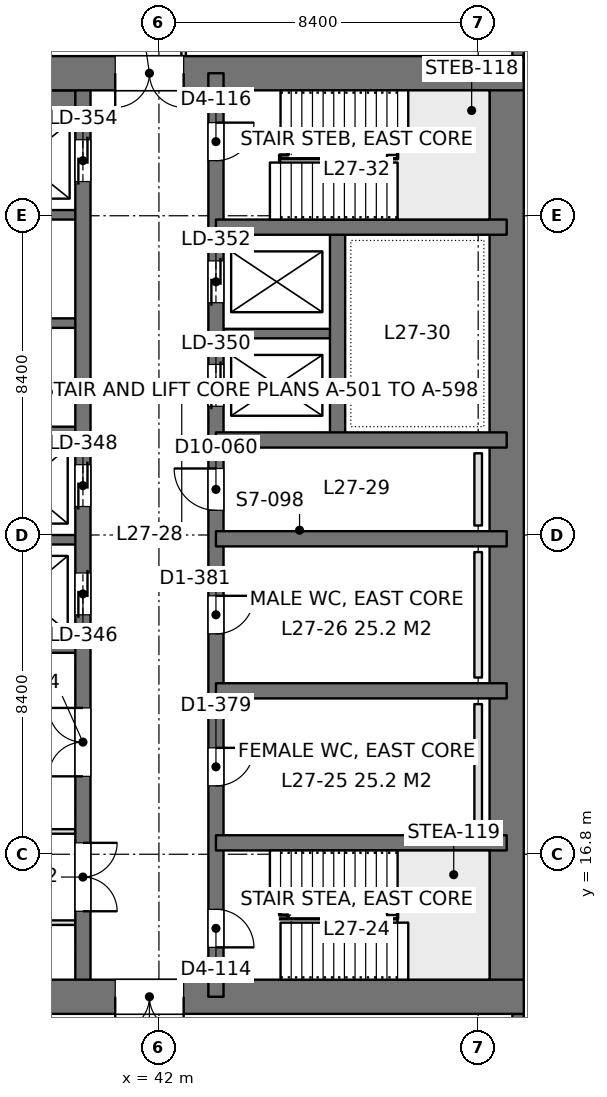
"""IFC4 building model, lengths in metres.
Left out: names, types, materials, properties, quantities, classifications, styles, units other than length and angle.
Written with IfcOpenShell. Run it as: python <this file> out.ifc"""

import sys

from ifc_helpers import new_model, si_unit, direction, frame, frame_2d, origin, place, context, subcontext, project, spatial, rectangle, extrude, element, fill, save


model = new_model("IFC4")
c1 = context("Model", 3, precision=1e-05, world=origin(), true_north=direction((0.0, 1.0)))
c2 = subcontext(c1, "Body", "Model", "MODEL_VIEW")
j1 = project(units=[si_unit("LENGTHUNIT", "METRE"), si_unit("PLANEANGLEUNIT", "RADIAN")], contexts=[c1])
p1 = place(None, origin())
s1 = spatial("IfcSite", under=j1, at=p1, CompositionType="ELEMENT")
p2 = place(p1, origin())
s2 = spatial("IfcBuilding", under=s1, at=p2, CompositionType="ELEMENT")
p3 = place(p2, frame((0.0, 0.0, 121.8)))
s3 = spatial("IfcBuildingStorey", under=s2, at=p3, CompositionType="ELEMENT", Elevation=121.8)
p4 = place(p3, frame((33.6, 13.05, 0.0), z_axis=(0.0, 0.0, 1.0), x_axis=(1.0, 0.0, 0.0)))
e1 = element("IfcWall", 1, at=p4, inside=s3, PredefinedType="SHEAR", context=c2, shape_type="SweptSolid", body=[
    extrude(rectangle(XDim=18.0, YDim=0.9, at=frame_2d((9.0, 0.0))), origin(), (0.0, 0.0, 1.0), 4.2),
])
p5 = place(p4, frame((7.25, 0.0, 0.0)))
e2 = element("IfcOpeningElement", 2, at=p5, cuts=e1, PredefinedType="OPENING", context=c2, shape_type="SweptSolid", body=[
    extrude(rectangle(XDim=1.8, YDim=2.4, at=frame_2d((0.9, 1.2))), frame((0.0, 0.46, 0.0), z_axis=(0.0, -1.0, 0.0), x_axis=(1.0, 0.0, 0.0)), (0.0, 0.0, 1.0), 0.92),
])
p6 = place(p3, frame((33.6, 37.35, 0.0), z_axis=(0.0, 0.0, 1.0), x_axis=(1.0, 0.0, 0.0)))
e3 = element("IfcWall", 3, at=p6, inside=s3, PredefinedType="SHEAR", context=c2, shape_type="SweptSolid", body=[
    extrude(rectangle(XDim=18.0, YDim=0.9, at=frame_2d((9.0, 0.0))), origin(), (0.0, 0.0, 1.0), 4.2),
])
p7 = place(p6, frame((7.25, 0.0, 0.0)))
e4 = element("IfcOpeningElement", 4, at=p7, cuts=e3, PredefinedType="OPENING", context=c2, shape_type="SweptSolid", body=[
    extrude(rectangle(XDim=1.8, YDim=2.4, at=frame_2d((0.9, 1.2))), frame((0.0, 0.46, 0.0), z_axis=(0.0, -1.0, 0.0), x_axis=(1.0, 0.0, 0.0)), (0.0, 0.0, 1.0), 0.92),
])
p8 = place(p3, frame((51.15, 13.05, 0.0), z_axis=(0.0, 0.0, 1.0), x_axis=(0.0, 1.0, 0.0)))
e5 = element("IfcWall", 5, at=p8, inside=s3, PredefinedType="SHEAR", context=c2, shape_type="SweptSolid", body=[
    extrude(rectangle(XDim=24.3, YDim=0.9, at=frame_2d((12.15, 0.0))), origin(), (0.0, 0.0, 1.0), 4.2),
])
p9 = place(p3, frame((43.5, 13.05, 0.0), z_axis=(0.0, 0.0, 1.0), x_axis=(0.0, 1.0, 0.0)))
e6 = element("IfcWall", 6, at=p9, inside=s3, PredefinedType="SHEAR", context=c2, shape_type="SweptSolid", body=[
    extrude(rectangle(XDim=24.3, YDim=0.4, at=frame_2d((12.15, 0.0))), origin(), (0.0, 0.0, 1.0), 4.2),
])
p10 = place(p9, frame((1.3, 0.0, 0.0)))
e7 = element("IfcOpeningElement", 7, at=p10, cuts=e6, PredefinedType="OPENING", context=c2, shape_type="SweptSolid", body=[
    extrude(rectangle(XDim=1.0, YDim=2.2, at=frame_2d((0.5, 1.1))), frame((0.0, 0.21, 0.0), z_axis=(0.0, -1.0, 0.0), x_axis=(1.0, 0.0, 0.0)), (0.0, 0.0, 1.0), 0.42),
])
p11 = place(p9, frame((22.0, 0.0, 0.0)))
e8 = element("IfcOpeningElement", 8, at=p11, cuts=e6, PredefinedType="OPENING", context=c2, shape_type="SweptSolid", body=[
    extrude(rectangle(XDim=1.0, YDim=2.2, at=frame_2d((0.5, 1.1))), frame((0.0, 0.21, 0.0), z_axis=(0.0, -1.0, 0.0), x_axis=(1.0, 0.0, 0.0)), (0.0, 0.0, 1.0), 0.42),
])
p12 = place(p9, frame((5.55, 0.0, 0.0)))
e9 = element("IfcOpeningElement", 9, at=p12, cuts=e6, PredefinedType="OPENING", context=c2, shape_type="SweptSolid", body=[
    extrude(rectangle(XDim=1.0, YDim=2.2, at=frame_2d((0.5, 1.1))), frame((0.0, 0.21, 0.0), z_axis=(0.0, -1.0, 0.0), x_axis=(1.0, 0.0, 0.0)), (0.0, 0.0, 1.0), 0.42),
])
p13 = place(p9, frame((9.55, 0.0, 0.0)))
e10 = element("IfcOpeningElement", 10, at=p13, cuts=e6, PredefinedType="OPENING", context=c2, shape_type="SweptSolid", body=[
    extrude(rectangle(XDim=1.0, YDim=2.2, at=frame_2d((0.5, 1.1))), frame((0.0, 0.21, 0.0), z_axis=(0.0, -1.0, 0.0), x_axis=(1.0, 0.0, 0.0)), (0.0, 0.0, 1.0), 0.42),
])
p14 = place(p9, frame((12.8, 0.0, 0.0)))
e11 = element("IfcOpeningElement", 11, at=p14, cuts=e6, PredefinedType="OPENING", context=c2, shape_type="SweptSolid", body=[
    extrude(rectangle(XDim=1.1, YDim=2.2, at=frame_2d((0.55, 1.1))), frame((0.0, 0.21, 0.0), z_axis=(0.0, -1.0, 0.0), x_axis=(1.0, 0.0, 0.0)), (0.0, 0.0, 1.0), 0.42),
])
p15 = place(p9, frame((15.538, 0.0, 0.0)))
e12 = element("IfcOpeningElement", 12, at=p15, cuts=e6, PredefinedType="OPENING", context=c2, shape_type="SweptSolid", body=[
    extrude(rectangle(XDim=1.1, YDim=2.2, at=frame_2d((0.55, 1.1))), frame((0.0, 0.21, 0.0), z_axis=(0.0, -1.0, 0.0), x_axis=(1.0, 0.0, 0.0)), (0.0, 0.0, 1.0), 0.42),
])
p16 = place(p9, frame((18.262, 0.0, 0.0)))
e13 = element("IfcOpeningElement", 13, at=p16, cuts=e6, PredefinedType="OPENING", context=c2, shape_type="SweptSolid", body=[
    extrude(rectangle(XDim=1.1, YDim=2.2, at=frame_2d((0.55, 1.1))), frame((0.0, 0.21, 0.0), z_axis=(0.0, -1.0, 0.0), x_axis=(1.0, 0.0, 0.0)), (0.0, 0.0, 1.0), 0.42),
])
p17 = place(p3, frame((40.0, 13.05, 0.0), z_axis=(0.0, 0.0, 1.0), x_axis=(0.0, 1.0, 0.0)))
e14 = element("IfcWall", 14, at=p17, inside=s3, PredefinedType="SHEAR", context=c2, shape_type="SweptSolid", body=[
    extrude(rectangle(XDim=24.3, YDim=0.4, at=frame_2d((12.15, 0.0))), origin(), (0.0, 0.0, 1.0), 4.2),
])
p18 = place(p17, frame((10.05, 0.0, 0.0)))
e15 = element("IfcOpeningElement", 15, at=p18, cuts=e14, PredefinedType="OPENING", context=c2, shape_type="SweptSolid", body=[
    extrude(rectangle(XDim=1.1, YDim=2.2, at=frame_2d((0.55, 1.1))), frame((0.0, 0.21, 0.0), z_axis=(0.0, -1.0, 0.0), x_axis=(1.0, 0.0, 0.0)), (0.0, 0.0, 1.0), 0.42),
])
p19 = place(p17, frame((12.9, 0.0, 0.0)))
e16 = element("IfcOpeningElement", 16, at=p19, cuts=e14, PredefinedType="OPENING", context=c2, shape_type="SweptSolid", body=[
    extrude(rectangle(XDim=1.1, YDim=2.2, at=frame_2d((0.55, 1.1))), frame((0.0, 0.21, 0.0), z_axis=(0.0, -1.0, 0.0), x_axis=(1.0, 0.0, 0.0)), (0.0, 0.0, 1.0), 0.42),
])
p20 = place(p17, frame((21.45, 0.0, 0.0)))
e17 = element("IfcOpeningElement", 17, at=p20, cuts=e14, PredefinedType="OPENING", context=c2, shape_type="SweptSolid", body=[
    extrude(rectangle(XDim=1.1, YDim=2.2, at=frame_2d((0.55, 1.1))), frame((0.0, 0.21, 0.0), z_axis=(0.0, -1.0, 0.0), x_axis=(1.0, 0.0, 0.0)), (0.0, 0.0, 1.0), 0.42),
])
p21 = place(p17, frame((2.25, 0.0, 0.0)))
e18 = element("IfcOpeningElement", 18, at=p21, cuts=e14, PredefinedType="OPENING", context=c2, shape_type="SweptSolid", body=[
    extrude(rectangle(XDim=1.8, YDim=2.4, at=frame_2d((0.9, 1.2))), frame((0.0, 0.21, 0.0), z_axis=(0.0, -1.0, 0.0), x_axis=(1.0, 0.0, 0.0)), (0.0, 0.0, 1.0), 0.42),
])
p22 = place(p17, frame((5.8, 0.0, 0.0)))
e19 = element("IfcOpeningElement", 19, at=p22, cuts=e14, PredefinedType="OPENING", context=c2, shape_type="SweptSolid", body=[
    extrude(rectangle(XDim=1.8, YDim=2.4, at=frame_2d((0.9, 1.2))), frame((0.0, 0.21, 0.0), z_axis=(0.0, -1.0, 0.0), x_axis=(1.0, 0.0, 0.0)), (0.0, 0.0, 1.0), 0.42),
])
for number, where, z_axis, x_axis in (
    (20, (51.15, 17.1, 0.0), (0.0, 0.0, 1.0), (-1.0, 0.0, 0.0)),
    (21, (51.15, 21.1, 0.0), (0.0, 0.0, 1.0), (-1.0, 0.0, 0.0)),
    (22, (51.15, 25.1, 0.0), (0.0, 0.0, 1.0), (-1.0, 0.0, 0.0)),
    (23, (51.15, 27.7, 0.0), (0.0, 0.0, 1.0), (-1.0, 0.0, 0.0)),
    (24, (51.15, 33.3, 0.0), (0.0, 0.0, 1.0), (-1.0, 0.0, 0.0)),
):
    element("IfcWall", number, at=place(p3, frame(where, z_axis=z_axis, x_axis=x_axis)), inside=s3, PredefinedType="SHEAR", context=c2, shape_type="SweptSolid", body=[
        extrude(rectangle(XDim=7.65, YDim=0.4, at=frame_2d((3.825, 0.0))), origin(), (0.0, 0.0, 1.0), 4.2),
    ])
p23 = place(p3, frame((46.7, 27.7, 0.0), z_axis=(0.0, 0.0, 1.0), x_axis=(0.0, 1.0, 0.0)))
e25 = element("IfcWall", 25, at=p23, inside=s3, PredefinedType="SHEAR", context=c2, shape_type="SweptSolid", body=[
    extrude(rectangle(XDim=5.6, YDim=0.4, at=frame_2d((2.8, 0.0))), origin(), (0.0, 0.0, 1.0), 4.2),
])
p24 = place(p3, frame((46.7, 30.5, 0.0), z_axis=(0.0, 0.0, 1.0), x_axis=(-1.0, 0.0, 0.0)))
e26 = element("IfcWall", 26, at=p24, inside=s3, PredefinedType="SHEAR", context=c2, shape_type="SweptSolid", body=[
    extrude(rectangle(XDim=3.2, YDim=0.25, at=frame_2d((1.6, 0.0))), origin(), (0.0, 0.0, 1.0), 4.2),
])
p25 = place(p3, frame((40.0, 22.225, 0.0), z_axis=(0.0, 0.0, 1.0), x_axis=(-1.0, 0.0, 0.0)))
e27 = element("IfcWall", 27, at=p25, inside=s3, PredefinedType="SHEAR", context=c2, shape_type="SweptSolid", body=[
    extrude(rectangle(XDim=5.95, YDim=0.25, at=frame_2d((2.975, 0.0))), origin(), (0.0, 0.0, 1.0), 4.2),
])
for number, where, z_axis, x_axis in (
    (28, (40.0, 25.075, 0.0), (0.0, 0.0, 1.0), (-1.0, 0.0, 0.0)),
    (29, (40.0, 27.925, 0.0), (0.0, 0.0, 1.0), (-1.0, 0.0, 0.0)),
    (30, (40.0, 30.775, 0.0), (0.0, 0.0, 1.0), (-1.0, 0.0, 0.0)),
    (31, (40.0, 33.625, 0.0), (0.0, 0.0, 1.0), (-1.0, 0.0, 0.0)),
):
    element("IfcWall", number, at=place(p3, frame(where, z_axis=z_axis, x_axis=x_axis)), inside=s3, PredefinedType="SHEAR", context=c2, shape_type="SweptSolid", body=[
        extrude(rectangle(XDim=3.2, YDim=0.25, at=frame_2d((1.6, 0.0))), origin(), (0.0, 0.0, 1.0), 4.2),
    ])
p26 = place(p3, frame((40.0, 36.625, 0.0), z_axis=(0.0, 0.0, 1.0), x_axis=(-1.0, 0.0, 0.0)))
e32 = element("IfcWall", 32, at=p26, inside=s3, PredefinedType="SHEAR", context=c2, shape_type="SweptSolid", body=[
    extrude(rectangle(XDim=3.2, YDim=0.55, at=frame_2d((1.6, 0.0))), origin(), (0.0, 0.0, 1.0), 4.2),
])
p27 = place(p3, frame((51.45, 42.0, 0.0), z_axis=(0.0, 0.0, 1.0), x_axis=(0.0, -1.0, 0.0)))
e33 = element("IfcWall", 33, at=p27, inside=s3, PredefinedType="SOLIDWALL", context=c2, shape_type="SweptSolid", body=[
    extrude(rectangle(XDim=4.2, YDim=0.3, at=frame_2d((2.1, 0.0))), origin(), (0.0, 0.0, 1.0), 4.05),
])
p28 = place(p27, frame((0.9, 0.0, 0.9)))
e34 = element("IfcOpeningElement", 34, at=p28, cuts=e33, PredefinedType="OPENING", context=c2, shape_type="SweptSolid", body=[
    extrude(rectangle(XDim=2.4, YDim=1.9, at=frame_2d((1.2, 0.95))), frame((0.0, 0.16, 0.0), z_axis=(0.0, -1.0, 0.0), x_axis=(1.0, 0.0, 0.0)), (0.0, 0.0, 1.0), 0.32),
])
p29 = place(p3, frame((51.45, 12.6, 0.0), z_axis=(0.0, 0.0, 1.0), x_axis=(0.0, -1.0, 0.0)))
e35 = element("IfcWall", 35, at=p29, inside=s3, PredefinedType="SOLIDWALL", context=c2, shape_type="SweptSolid", body=[
    extrude(rectangle(XDim=4.2, YDim=0.3, at=frame_2d((2.1, 0.0))), origin(), (0.0, 0.0, 1.0), 4.05),
])
p30 = place(p29, frame((0.9, 0.0, 0.9)))
e36 = element("IfcOpeningElement", 36, at=p30, cuts=e35, PredefinedType="OPENING", context=c2, shape_type="SweptSolid", body=[
    extrude(rectangle(XDim=2.4, YDim=1.9, at=frame_2d((1.2, 0.95))), frame((0.0, 0.16, 0.0), z_axis=(0.0, -1.0, 0.0), x_axis=(1.0, 0.0, 0.0)), (0.0, 0.0, 1.0), 0.32),
])
p31 = place(p3, frame((33.898, 17.4, 0.0), z_axis=(0.0, 0.0, 1.0), x_axis=(1.0, 0.0, 0.0)))
e37 = element("IfcWall", 37, at=p31, inside=s3, PredefinedType="PARTITIONING", context=c2, shape_type="SweptSolid", body=[
    extrude(rectangle(XDim=5.904, YDim=0.12, at=frame_2d((2.952, 0.0))), origin(), (0.0, 0.0, 1.0), 3.55),
])
p32 = place(p3, frame((33.598, 15.0, 0.0), z_axis=(0.0, 0.0, 1.0), x_axis=(1.0, 0.0, 0.0)))
e38 = element("IfcWall", 38, at=p32, inside=s3, PredefinedType="PARTITIONING", context=c2, shape_type="SweptSolid", body=[
    extrude(rectangle(XDim=6.204, YDim=0.12, at=frame_2d((3.102, 0.0))), origin(), (0.0, 0.0, 1.0), 3.55),
])
p33 = place(p3, frame((42.65, 37.8, 0.0), z_axis=(0.0, 0.0, 1.0), x_axis=(0.0, 1.0, 0.0)))
e39 = element("IfcWall", 39, at=p33, inside=s3, PredefinedType="PARTITIONING", context=c2, shape_type="SweptSolid", body=[
    extrude(rectangle(XDim=2.0, YDim=0.12, at=frame_2d((1.0, 0.0))), origin(), (0.0, 0.0, 1.0), 4.05),
])
for number, where, z_axis, x_axis in (
    (40, (50.4, 17.45, 0.0), (0.0, 0.0, 1.0), (0.0, 1.0, 0.0)),
    (41, (50.4, 21.45, 0.0), (0.0, 0.0, 1.0), (0.0, 1.0, 0.0)),
):
    element("IfcWall", number, at=place(p3, frame(where, z_axis=z_axis, x_axis=x_axis)), inside=s3, PredefinedType="PLUMBINGWALL", context=c2, shape_type="SweptSolid", body=[
        extrude(rectangle(XDim=3.3, YDim=0.2, at=frame_2d((1.65, 0.0))), origin(), (0.0, 0.0, 1.0), 1.2),
    ])
p34 = place(p3, frame((50.4, 25.45, 0.0), z_axis=(0.0, 0.0, 1.0), x_axis=(0.0, 1.0, 0.0)))
e42 = element("IfcWall", 42, at=p34, inside=s3, PredefinedType="PLUMBINGWALL", context=c2, shape_type="SweptSolid", body=[
    extrude(rectangle(XDim=1.9, YDim=0.2, at=frame_2d((0.95, 0.0))), origin(), (0.0, 0.0, 1.0), 1.2),
])
p35 = place(p5, frame((1.8, 0.0, 0.0), z_axis=(0.0, 0.0, 1.0), x_axis=(-1.0, 0.0, 0.0)))
e43 = element("IfcDoor", 43, at=p35, inside=s3, OperationType="DOUBLE_DOOR_SINGLE_SWING", PredefinedType="DOOR", context=c2, shape_type="SweptSolid", body=[
    extrude(rectangle(XDim=1.8, YDim=2.4, at=frame_2d((0.9, 1.2))), frame((0.0, 0.025, 0.0), z_axis=(0.0, -1.0, 0.0), x_axis=(1.0, 0.0, 0.0)), (0.0, 0.0, 1.0), 0.05),
])
fill(e2, e43)
p36 = place(p7, frame((1.8, 0.0, 0.0), z_axis=(0.0, 0.0, 1.0), x_axis=(-1.0, 0.0, 0.0)))
e44 = element("IfcDoor", 44, at=p36, inside=s3, OperationType="DOUBLE_DOOR_SINGLE_SWING", PredefinedType="DOOR", context=c2, shape_type="SweptSolid", body=[
    extrude(rectangle(XDim=1.8, YDim=2.4, at=frame_2d((0.9, 1.2))), frame((0.0, 0.025, 0.0), z_axis=(0.0, -1.0, 0.0), x_axis=(1.0, 0.0, 0.0)), (0.0, 0.0, 1.0), 0.05),
])
fill(e4, e44)
p37 = place(p10, frame((1.0, 0.0, 0.0), z_axis=(0.0, 0.0, 1.0), x_axis=(-1.0, 0.0, 0.0)))
e45 = element("IfcDoor", 45, at=p37, inside=s3, OperationType="SINGLE_SWING_RIGHT", PredefinedType="DOOR", context=c2, shape_type="SweptSolid", body=[
    extrude(rectangle(XDim=1.0, YDim=2.2, at=frame_2d((0.5, 1.1))), frame((0.0, 0.025, 0.0), z_axis=(0.0, -1.0, 0.0), x_axis=(1.0, 0.0, 0.0)), (0.0, 0.0, 1.0), 0.05),
])
fill(e7, e45)
p38 = place(p11, frame((1.0, 0.0, 0.0), z_axis=(0.0, 0.0, 1.0), x_axis=(-1.0, 0.0, 0.0)))
e46 = element("IfcDoor", 46, at=p38, inside=s3, OperationType="SINGLE_SWING_LEFT", PredefinedType="DOOR", context=c2, shape_type="SweptSolid", body=[
    extrude(rectangle(XDim=1.0, YDim=2.2, at=frame_2d((0.5, 1.1))), frame((0.0, 0.025, 0.0), z_axis=(0.0, -1.0, 0.0), x_axis=(1.0, 0.0, 0.0)), (0.0, 0.0, 1.0), 0.05),
])
fill(e8, e46)
p39 = place(p12, frame((1.0, 0.0, 0.0), z_axis=(0.0, 0.0, 1.0), x_axis=(-1.0, 0.0, 0.0)))
e47 = element("IfcDoor", 47, at=p39, inside=s3, OperationType="SINGLE_SWING_LEFT", PredefinedType="DOOR", context=c2, shape_type="SweptSolid", body=[
    extrude(rectangle(XDim=1.0, YDim=2.2, at=frame_2d((0.5, 1.1))), frame((0.0, 0.025, 0.0), z_axis=(0.0, -1.0, 0.0), x_axis=(1.0, 0.0, 0.0)), (0.0, 0.0, 1.0), 0.05),
])
fill(e9, e47)
p40 = place(p13, frame((1.0, 0.0, 0.0), z_axis=(0.0, 0.0, 1.0), x_axis=(-1.0, 0.0, 0.0)))
e48 = element("IfcDoor", 48, at=p40, inside=s3, OperationType="SINGLE_SWING_LEFT", PredefinedType="DOOR", context=c2, shape_type="SweptSolid", body=[
    extrude(rectangle(XDim=1.0, YDim=2.2, at=frame_2d((0.5, 1.1))), frame((0.0, 0.025, 0.0), z_axis=(0.0, -1.0, 0.0), x_axis=(1.0, 0.0, 0.0)), (0.0, 0.0, 1.0), 0.05),
])
fill(e10, e48)
p41 = place(p14, origin())
e49 = element("IfcDoor", 49, at=p41, inside=s3, OperationType="SINGLE_SWING_RIGHT", PredefinedType="DOOR", context=c2, shape_type="SweptSolid", body=[
    extrude(rectangle(XDim=1.1, YDim=2.2, at=frame_2d((0.55, 1.1))), frame((0.0, 0.025, 0.0), z_axis=(0.0, -1.0, 0.0), x_axis=(1.0, 0.0, 0.0)), (0.0, 0.0, 1.0), 0.05),
])
fill(e11, e49)
p42 = place(p18, origin())
e50 = element("IfcDoor", 50, at=p42, inside=s3, OperationType="DOUBLE_DOOR_SLIDING", PredefinedType="DOOR", context=c2, shape_type="SweptSolid", body=[
    extrude(rectangle(XDim=1.1, YDim=2.2, at=frame_2d((0.55, 1.1))), frame((0.0, 0.025, 0.0), z_axis=(0.0, -1.0, 0.0), x_axis=(1.0, 0.0, 0.0)), (0.0, 0.0, 1.0), 0.05),
])
fill(e15, e50)
p43 = place(p19, origin())
e51 = element("IfcDoor", 51, at=p43, inside=s3, OperationType="DOUBLE_DOOR_SLIDING", PredefinedType="DOOR", context=c2, shape_type="SweptSolid", body=[
    extrude(rectangle(XDim=1.1, YDim=2.2, at=frame_2d((0.55, 1.1))), frame((0.0, 0.025, 0.0), z_axis=(0.0, -1.0, 0.0), x_axis=(1.0, 0.0, 0.0)), (0.0, 0.0, 1.0), 0.05),
])
fill(e16, e51)
p44 = place(p20, origin())
e52 = element("IfcDoor", 52, at=p44, inside=s3, OperationType="DOUBLE_DOOR_SLIDING", PredefinedType="DOOR", context=c2, shape_type="SweptSolid", body=[
    extrude(rectangle(XDim=1.1, YDim=2.2, at=frame_2d((0.55, 1.1))), frame((0.0, 0.025, 0.0), z_axis=(0.0, -1.0, 0.0), x_axis=(1.0, 0.0, 0.0)), (0.0, 0.0, 1.0), 0.05),
])
fill(e17, e52)
p45 = place(p15, origin())
e53 = element("IfcDoor", 53, at=p45, inside=s3, OperationType="DOUBLE_DOOR_SLIDING", PredefinedType="DOOR", context=c2, shape_type="SweptSolid", body=[
    extrude(rectangle(XDim=1.1, YDim=2.2, at=frame_2d((0.55, 1.1))), frame((0.0, 0.025, 0.0), z_axis=(0.0, -1.0, 0.0), x_axis=(1.0, 0.0, 0.0)), (0.0, 0.0, 1.0), 0.05),
])
fill(e12, e53)
p46 = place(p16, origin())
e54 = element("IfcDoor", 54, at=p46, inside=s3, OperationType="DOUBLE_DOOR_SLIDING", PredefinedType="DOOR", context=c2, shape_type="SweptSolid", body=[
    extrude(rectangle(XDim=1.1, YDim=2.2, at=frame_2d((0.55, 1.1))), frame((0.0, 0.025, 0.0), z_axis=(0.0, -1.0, 0.0), x_axis=(1.0, 0.0, 0.0)), (0.0, 0.0, 1.0), 0.05),
])
fill(e13, e54)
p47 = place(p21, frame((1.8, 0.0, 0.0), z_axis=(0.0, 0.0, 1.0), x_axis=(-1.0, 0.0, 0.0)))
e55 = element("IfcDoor", 55, at=p47, inside=s3, OperationType="DOUBLE_DOOR_SINGLE_SWING", PredefinedType="DOOR", context=c2, shape_type="SweptSolid", body=[
    extrude(rectangle(XDim=1.8, YDim=2.4, at=frame_2d((0.9, 1.2))), frame((0.0, 0.025, 0.0), z_axis=(0.0, -1.0, 0.0), x_axis=(1.0, 0.0, 0.0)), (0.0, 0.0, 1.0), 0.05),
])
fill(e18, e55)
p48 = place(p22, origin())
e56 = element("IfcDoor", 56, at=p48, inside=s3, OperationType="DOUBLE_DOOR_SINGLE_SWING", PredefinedType="DOOR", context=c2, shape_type="SweptSolid", body=[
    extrude(rectangle(XDim=1.8, YDim=2.4, at=frame_2d((0.9, 1.2))), frame((0.0, 0.025, 0.0), z_axis=(0.0, -1.0, 0.0), x_axis=(1.0, 0.0, 0.0)), (0.0, 0.0, 1.0), 0.05),
])
fill(e19, e56)
save(model, sys.argv[1])
